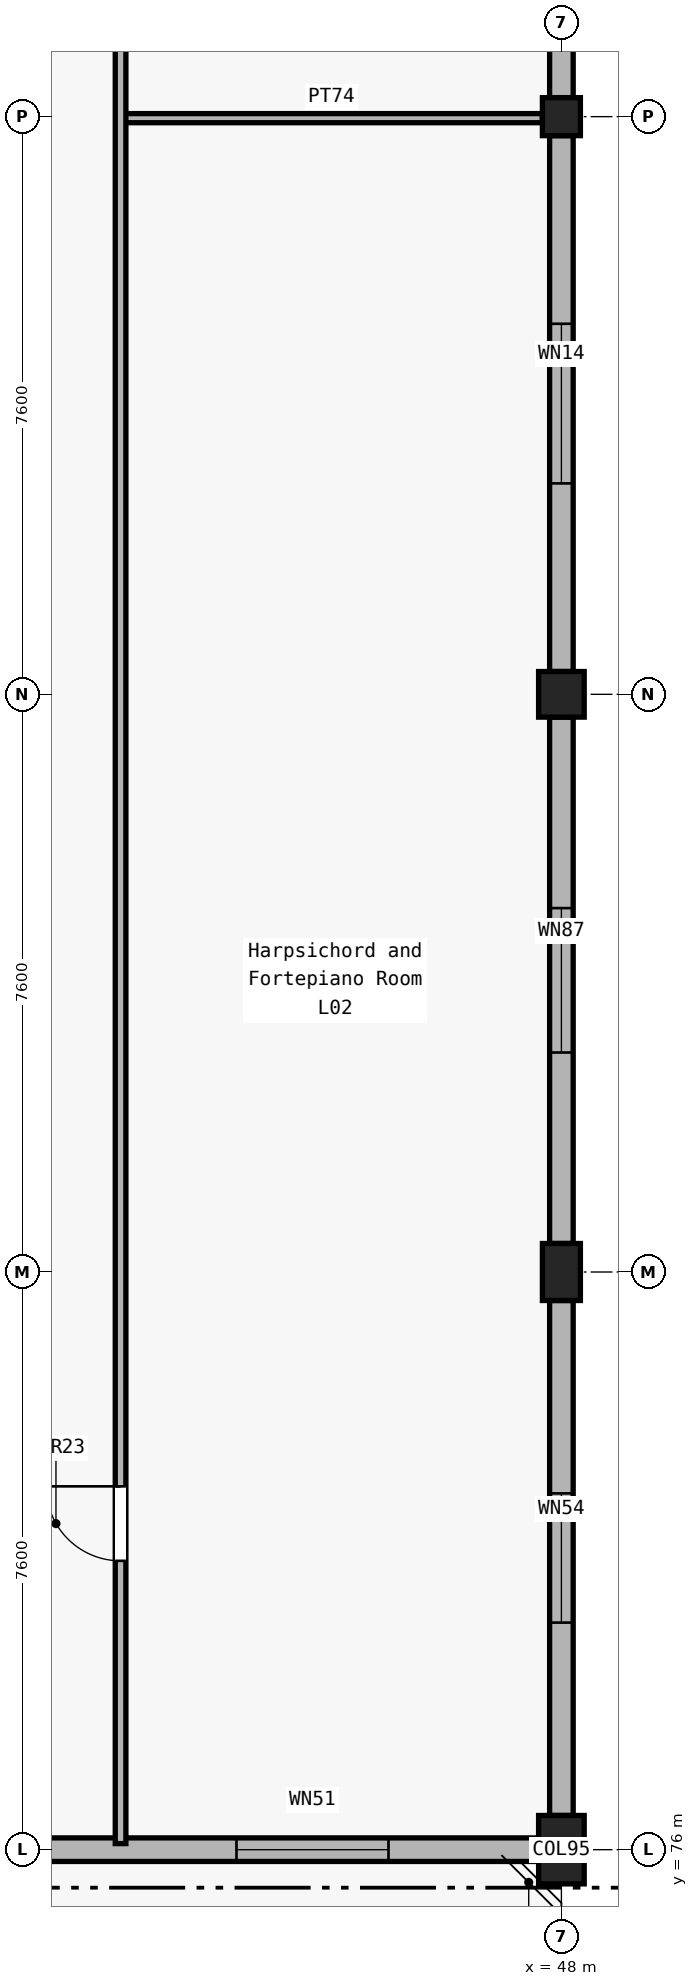
"""IFC4 building model, lengths in metres.
Left out: names, types, materials, properties, quantities, classifications, styles, units other than length and angle.
Written with IfcOpenShell. Run it as: python <this file> out.ifc"""

import sys

from ifc_helpers import new_model, si_unit, direction, frame, frame_2d, origin, origin_2d, place, context, subcontext, project, spatial, rectangle, extrude, element, fill, save


model = new_model("IFC4")
c1 = context("Model", 3, precision=1e-05, world=origin(), true_north=direction((0.0, 1.0)))
c2 = subcontext(c1, "Body", "Model", "MODEL_VIEW")
j1 = project(units=[si_unit("LENGTHUNIT", "METRE"), si_unit("PLANEANGLEUNIT", "RADIAN")], contexts=[c1])
p1 = place(None, origin())
s1 = spatial("IfcSite", under=j1, at=p1, CompositionType="ELEMENT")
p2 = place(p1, origin())
s2 = spatial("IfcBuilding", under=s1, at=p2, CompositionType="ELEMENT")
p3 = place(p2, frame((0.0, 0.0, 10.2)))
s3 = spatial("IfcBuildingStorey", under=s2, at=p3, CompositionType="ELEMENT", Elevation=10.2)
p4 = place(p3, frame((48.0, 76.0, 0.0), z_axis=(0.0, 0.0, 1.0), x_axis=(1.0, 0.0, 0.0)))
e1 = element("IfcColumn", 1, at=p4, inside=s3, PredefinedType="COLUMN", context=c2, shape_type="SweptSolid", body=[
    extrude(rectangle(XDim=0.6, YDim=0.9, at=origin_2d()), origin(), (0.0, 0.0, 1.0), 4.8),
])
p5 = place(p3, frame((48.0, 83.6, 0.0), z_axis=(0.0, 0.0, 1.0), x_axis=(1.0, 0.0, 0.0)))
e2 = element("IfcColumn", 2, at=p5, inside=s3, PredefinedType="COLUMN", context=c2, shape_type="SweptSolid", body=[
    extrude(rectangle(XDim=0.5, YDim=0.75, at=origin_2d()), origin(), (0.0, 0.0, 1.0), 4.8),
])
p6 = place(p3, frame((48.0, 91.2, 0.0), z_axis=(0.0, 0.0, 1.0), x_axis=(1.0, 0.0, 0.0)))
e3 = element("IfcColumn", 3, at=p6, inside=s3, PredefinedType="COLUMN", context=c2, shape_type="SweptSolid", body=[
    extrude(rectangle(XDim=0.6, YDim=0.6, at=origin_2d()), origin(), (0.0, 0.0, 1.0), 4.8),
])
p7 = place(p3, frame((48.0, 98.8, 0.0), z_axis=(0.0, 0.0, 1.0), x_axis=(1.0, 0.0, 0.0)))
e4 = element("IfcColumn", 4, at=p7, inside=s3, PredefinedType="COLUMN", context=c2, shape_type="SweptSolid", body=[
    extrude(rectangle(XDim=0.5, YDim=0.5, at=origin_2d()), origin(), (0.0, 0.0, 1.0), 4.8),
])
p8 = place(p3, frame((47.7, 76.0, 0.0), z_axis=(0.0, 0.0, 1.0), x_axis=(-1.0, 0.0, 0.0)))
e5 = element("IfcWall", 5, at=p8, inside=s3, PredefinedType="SOLIDWALL", context=c2, shape_type="SweptSolid", body=[
    extrude(rectangle(XDim=7.35, YDim=0.31, at=frame_2d((3.675, 0.0))), origin(), (0.0, 0.0, 1.0), 4.06),
])
p9 = place(p8, frame((1.975, 0.0, 0.95)))
e6 = element("IfcOpeningElement", 6, at=p9, cuts=e5, PredefinedType="OPENING", context=c2, shape_type="SweptSolid", body=[
    extrude(rectangle(XDim=2.0, YDim=1.65, at=frame_2d((1.0, 0.825))), frame((0.0, 0.165, 0.0), z_axis=(0.0, -1.0, 0.0), x_axis=(1.0, 0.0, 0.0)), (0.0, 0.0, 1.0), 0.33),
])
p10 = place(p3, frame((48.0, 83.225, 0.0), z_axis=(0.0, 0.0, 1.0), x_axis=(0.0, -1.0, 0.0)))
e7 = element("IfcWall", 7, at=p10, inside=s3, PredefinedType="SOLIDWALL", context=c2, shape_type="SweptSolid", body=[
    extrude(rectangle(XDim=6.775, YDim=0.31, at=frame_2d((3.388, 0.0))), origin(), (0.0, 0.0, 1.0), 4.06),
])
p11 = place(p10, frame((2.538, 0.0, 0.95)))
e8 = element("IfcOpeningElement", 8, at=p11, cuts=e7, PredefinedType="OPENING", context=c2, shape_type="SweptSolid", body=[
    extrude(rectangle(XDim=1.7, YDim=1.8, at=frame_2d((0.85, 0.9))), frame((0.0, 0.165, 0.0), z_axis=(0.0, -1.0, 0.0), x_axis=(1.0, 0.0, 0.0)), (0.0, 0.0, 1.0), 0.33),
])
p12 = place(p3, frame((48.0, 90.9, 0.0), z_axis=(0.0, 0.0, 1.0), x_axis=(0.0, -1.0, 0.0)))
e9 = element("IfcWall", 9, at=p12, inside=s3, PredefinedType="SOLIDWALL", context=c2, shape_type="SweptSolid", body=[
    extrude(rectangle(XDim=6.925, YDim=0.31, at=frame_2d((3.462, 0.0))), origin(), (0.0, 0.0, 1.0), 4.06),
])
p13 = place(p12, frame((2.512, 0.0, 0.95)))
e10 = element("IfcOpeningElement", 10, at=p13, cuts=e9, PredefinedType="OPENING", context=c2, shape_type="SweptSolid", body=[
    extrude(rectangle(XDim=1.9, YDim=1.8, at=frame_2d((0.95, 0.9))), frame((0.0, 0.165, 0.0), z_axis=(0.0, -1.0, 0.0), x_axis=(1.0, 0.0, 0.0)), (0.0, 0.0, 1.0), 0.33),
])
p14 = place(p3, frame((48.0, 98.55, 0.0), z_axis=(0.0, 0.0, 1.0), x_axis=(0.0, -1.0, 0.0)))
e11 = element("IfcWall", 11, at=p14, inside=s3, PredefinedType="SOLIDWALL", context=c2, shape_type="SweptSolid", body=[
    extrude(rectangle(XDim=7.05, YDim=0.31, at=frame_2d((3.525, 0.0))), origin(), (0.0, 0.0, 1.0), 4.06),
])
p15 = place(p14, frame((2.475, 0.0, 0.95)))
e12 = element("IfcOpeningElement", 12, at=p15, cuts=e11, PredefinedType="OPENING", context=c2, shape_type="SweptSolid", body=[
    extrude(rectangle(XDim=2.1, YDim=1.8, at=frame_2d((1.05, 0.9))), frame((0.0, 0.165, 0.0), z_axis=(0.0, -1.0, 0.0), x_axis=(1.0, 0.0, 0.0)), (0.0, 0.0, 1.0), 0.33),
])
p16 = place(p3, frame((48.0, 106.0, 0.0), z_axis=(0.0, 0.0, 1.0), x_axis=(0.0, -1.0, 0.0)))
e13 = element("IfcWall", 13, at=p16, inside=s3, PredefinedType="SOLIDWALL", context=c2, shape_type="SweptSolid", body=[
    extrude(rectangle(XDim=6.95, YDim=0.31, at=frame_2d((3.475, 0.0))), origin(), (0.0, 0.0, 1.0), 4.06),
])
p17 = place(p16, frame((2.325, 0.0, 0.95)))
e14 = element("IfcOpeningElement", 14, at=p17, cuts=e13, PredefinedType="OPENING", context=c2, shape_type="SweptSolid", body=[
    extrude(rectangle(XDim=2.3, YDim=1.8, at=frame_2d((1.15, 0.9))), frame((0.0, 0.165, 0.0), z_axis=(0.0, -1.0, 0.0), x_axis=(1.0, 0.0, 0.0)), (0.0, 0.0, 1.0), 0.33),
])
p18 = place(p3, frame((42.2, 98.78, 0.0), z_axis=(0.0, 0.0, 1.0), x_axis=(1.0, 0.0, 0.0)))
e15 = element("IfcWall", 15, at=p18, inside=s3, PredefinedType="PARTITIONING", context=c2, shape_type="SweptSolid", body=[
    extrude(rectangle(XDim=5.55, YDim=0.12, at=frame_2d((2.775, 0.0))), origin(), (0.0, 0.0, 1.0), 3.865),
])
p19 = place(p3, frame((42.2, 76.08, 0.0), z_axis=(0.0, 0.0, 1.0), x_axis=(0.0, 1.0, 0.0)))
e16 = element("IfcWall", 16, at=p19, inside=s3, PredefinedType="PARTITIONING", context=c2, shape_type="SweptSolid", body=[
    extrude(rectangle(XDim=37.84, YDim=0.14, at=frame_2d((18.92, 0.0))), origin(), (0.0, 0.0, 1.0), 3.865),
])
p20 = place(p19, frame((3.72, 0.0, 0.0)))
e17 = element("IfcOpeningElement", 17, at=p20, cuts=e16, PredefinedType="OPENING", context=c2, shape_type="SweptSolid", body=[
    extrude(rectangle(XDim=0.98, YDim=2.05, at=frame_2d((0.49, 1.025))), frame((0.0, 0.08, 0.0), z_axis=(0.0, -1.0, 0.0), x_axis=(1.0, 0.0, 0.0)), (0.0, 0.0, 1.0), 0.16),
])
p21 = place(p19, frame((26.52, 0.0, 0.0)))
e18 = element("IfcOpeningElement", 18, at=p21, cuts=e16, PredefinedType="OPENING", context=c2, shape_type="SweptSolid", body=[
    extrude(rectangle(XDim=1.0, YDim=2.05, at=frame_2d((0.5, 1.025))), frame((0.0, 0.08, 0.0), z_axis=(0.0, -1.0, 0.0), x_axis=(1.0, 0.0, 0.0)), (0.0, 0.0, 1.0), 0.16),
])
p22 = place(p9, origin())
e19 = element("IfcWindow", 19, at=p22, inside=s3, PartitioningType="DOUBLE_PANEL_VERTICAL", PredefinedType="WINDOW", context=c2, shape_type="SweptSolid", body=[
    extrude(rectangle(XDim=2.0, YDim=1.65, at=frame_2d((1.0, 0.825))), frame((0.0, 0.03, 0.0), z_axis=(0.0, -1.0, 0.0), x_axis=(1.0, 0.0, 0.0)), (0.0, 0.0, 1.0), 0.06),
])
fill(e6, e19)
p23 = place(p11, origin())
e20 = element("IfcWindow", 20, at=p23, inside=s3, PartitioningType="SINGLE_PANEL", PredefinedType="WINDOW", context=c2, shape_type="SweptSolid", body=[
    extrude(rectangle(XDim=1.7, YDim=1.8, at=frame_2d((0.85, 0.9))), frame((0.0, 0.03, 0.0), z_axis=(0.0, -1.0, 0.0), x_axis=(1.0, 0.0, 0.0)), (0.0, 0.0, 1.0), 0.06),
])
fill(e8, e20)
p24 = place(p13, origin())
e21 = element("IfcWindow", 21, at=p24, inside=s3, PartitioningType="DOUBLE_PANEL_VERTICAL", PredefinedType="WINDOW", context=c2, shape_type="SweptSolid", body=[
    extrude(rectangle(XDim=1.9, YDim=1.8, at=frame_2d((0.95, 0.9))), frame((0.0, 0.03, 0.0), z_axis=(0.0, -1.0, 0.0), x_axis=(1.0, 0.0, 0.0)), (0.0, 0.0, 1.0), 0.06),
])
fill(e10, e21)
p25 = place(p15, origin())
e22 = element("IfcWindow", 22, at=p25, inside=s3, PartitioningType="DOUBLE_PANEL_VERTICAL", PredefinedType="WINDOW", context=c2, shape_type="SweptSolid", body=[
    extrude(rectangle(XDim=2.1, YDim=1.8, at=frame_2d((1.05, 0.9))), frame((0.0, 0.03, 0.0), z_axis=(0.0, -1.0, 0.0), x_axis=(1.0, 0.0, 0.0)), (0.0, 0.0, 1.0), 0.06),
])
fill(e12, e22)
p26 = place(p20, origin())
e23 = element("IfcDoor", 23, at=p26, inside=s3, OperationType="SINGLE_SWING_RIGHT", PredefinedType="DOOR", context=c2, shape_type="SweptSolid", body=[
    extrude(rectangle(XDim=0.98, YDim=2.05, at=frame_2d((0.49, 1.025))), frame((0.0, 0.025, 0.0), z_axis=(0.0, -1.0, 0.0), x_axis=(1.0, 0.0, 0.0)), (0.0, 0.0, 1.0), 0.05),
])
fill(e17, e23)
save(model, sys.argv[1])
